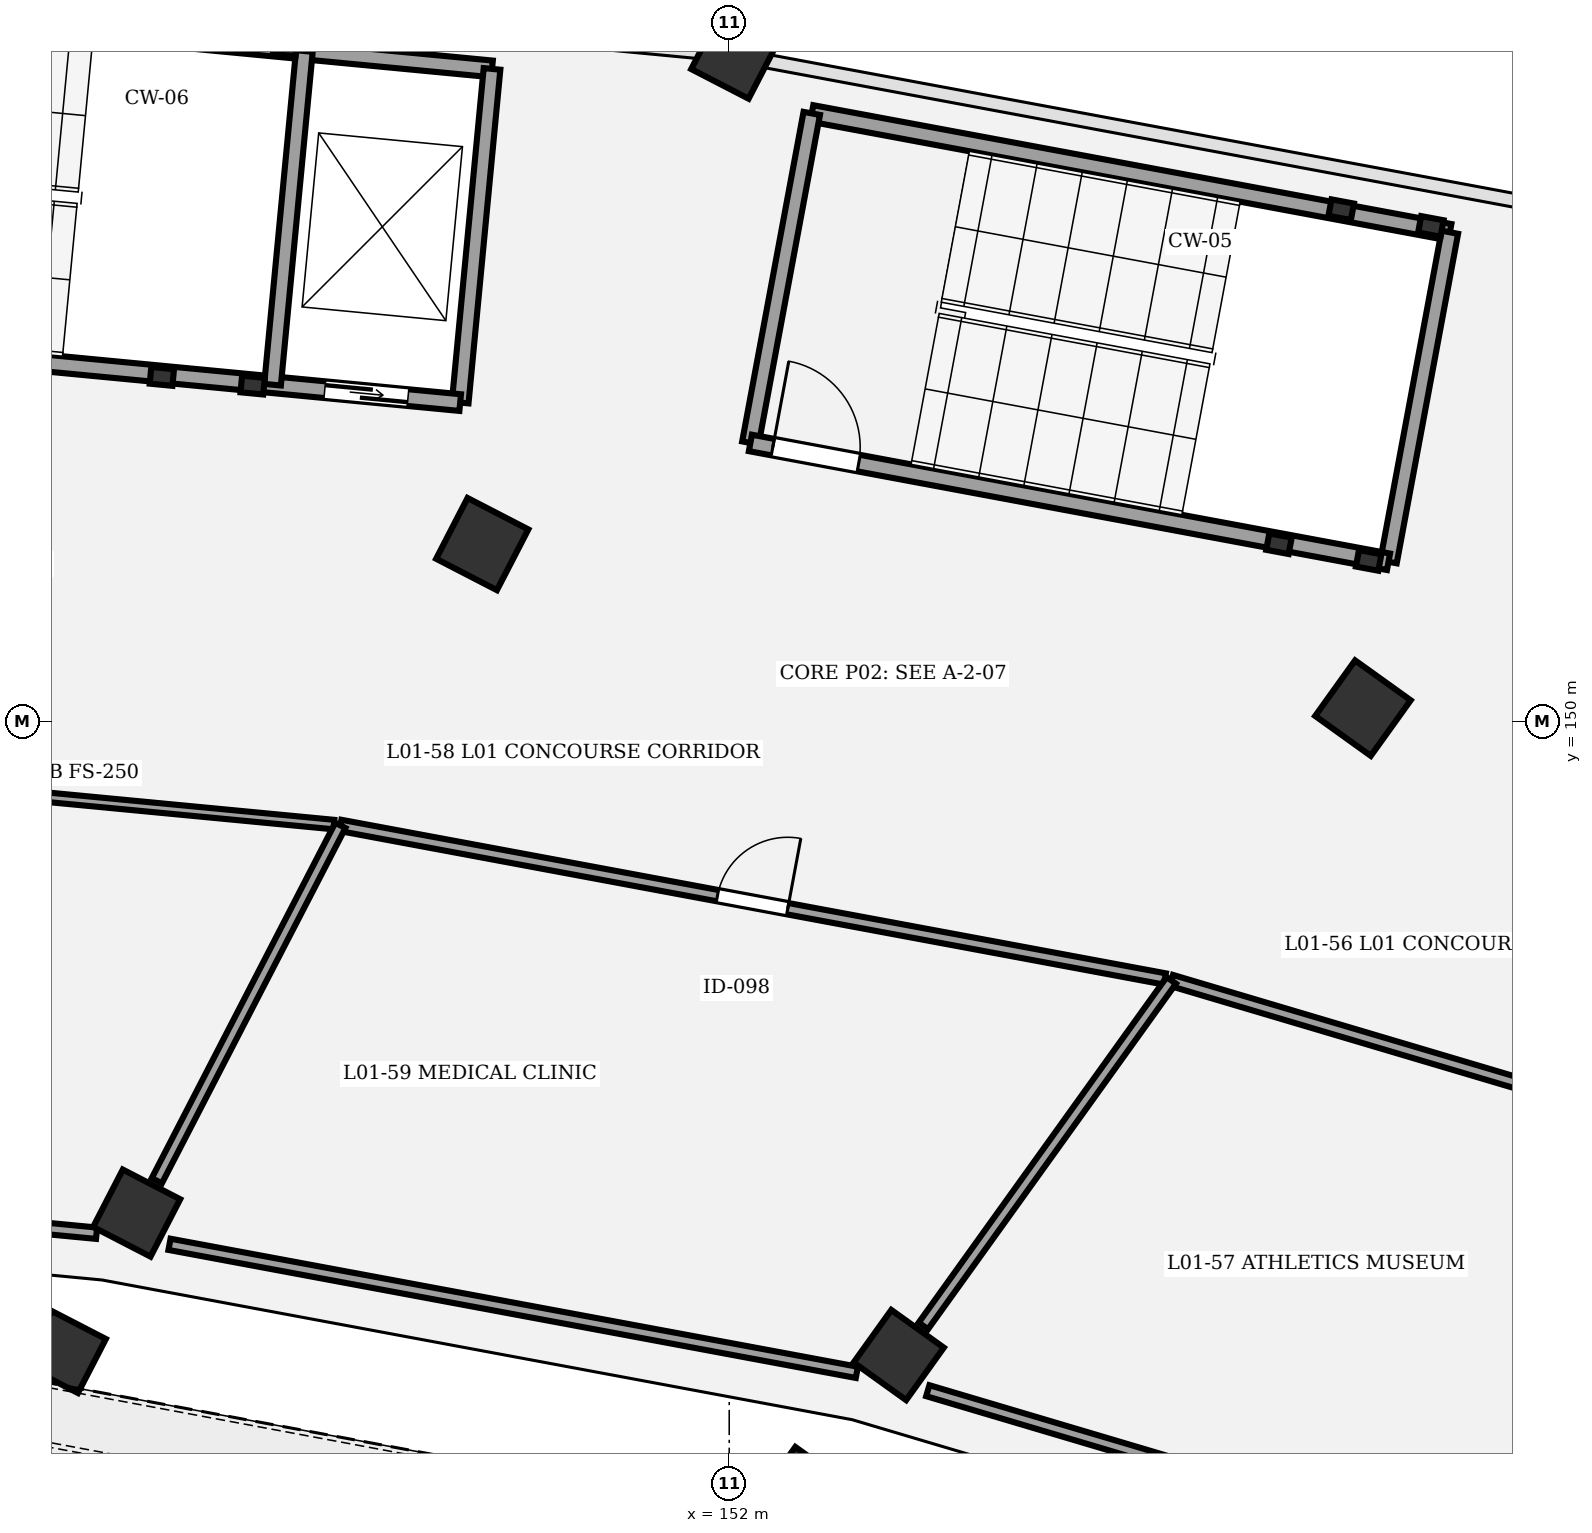
"""IFC4 building model, lengths in metres.
Left out: names, types, materials, properties, quantities, classifications, styles, units other than length and angle.
Written with IfcOpenShell. Run it as: python <this file> out.ifc"""

import sys

from ifc_helpers import new_model, si_unit, direction, frame, frame_2d, origin, origin_2d, place, context, subcontext, project, spatial, rectangle, extrude, element, fill, save


model = new_model("IFC4")
c1 = context("Model", 3, precision=1e-05, world=origin(), true_north=direction((0.0, 1.0)))
c2 = subcontext(c1, "Body", "Model", "MODEL_VIEW")
j1 = project(units=[si_unit("LENGTHUNIT", "METRE"), si_unit("PLANEANGLEUNIT", "RADIAN")], contexts=[c1])
p1 = place(None, origin())
s1 = spatial("IfcSite", under=j1, at=p1, CompositionType="ELEMENT")
p2 = place(p1, origin())
s2 = spatial("IfcBuilding", under=s1, at=p2, CompositionType="ELEMENT")
p3 = place(p2, frame((0.0, 0.0, 5.4)))
s3 = spatial("IfcBuildingStorey", under=s2, at=p3, CompositionType="ELEMENT", Elevation=5.4)
p4 = place(p3, frame((152.962, 139.899, 0.0), z_axis=(0.0, 0.0, 1.0), x_axis=(0.582974127943, 0.812490717577, 0.0)))
e1 = element("IfcColumn", 1, at=p4, inside=s3, PredefinedType="COLUMN", context=c2, shape_type="SweptSolid", body=[
    extrude(rectangle(XDim=0.8, YDim=0.8, at=origin_2d()), origin(), (0.0, 0.0, 1.0), 4.8),
])
p5 = place(p3, frame((154.23, 141.667, 0.0), z_axis=(0.0, 0.0, 1.0), x_axis=(0.582974127943, 0.812490717577, 0.0)))
e2 = element("IfcColumn", 2, at=p5, inside=s3, PredefinedType="COLUMN", context=c2, shape_type="SweptSolid", body=[
    extrude(rectangle(XDim=0.85, YDim=0.85, at=origin_2d()), origin(), (0.0, 0.0, 1.0), 4.8),
])
p6 = place(p3, frame((160.338, 150.177, 0.0), z_axis=(0.0, 0.0, 1.0), x_axis=(0.582974127943, 0.812490717577, 0.0)))
e3 = element("IfcColumn", 3, at=p6, inside=s3, PredefinedType="COLUMN", context=c2, shape_type="SweptSolid", body=[
    extrude(rectangle(XDim=0.9, YDim=0.9, at=origin_2d()), origin(), (0.0, 0.0, 1.0), 4.8),
])
p7 = place(p3, frame((143.259, 141.706, 0.0), z_axis=(0.0, 0.0, 1.0), x_axis=(0.458959712465, 0.888457079624, 0.0)))
e4 = element("IfcColumn", 4, at=p7, inside=s3, PredefinedType="COLUMN", context=c2, shape_type="SweptSolid", body=[
    extrude(rectangle(XDim=0.8, YDim=0.8, at=origin_2d()), origin(), (0.0, 0.0, 1.0), 4.8),
])
p8 = place(p3, frame((144.204, 143.534, 0.0), z_axis=(0.0, 0.0, 1.0), x_axis=(0.458959712465, 0.888457079624, 0.0)))
e5 = element("IfcColumn", 5, at=p8, inside=s3, PredefinedType="COLUMN", context=c2, shape_type="SweptSolid", body=[
    extrude(rectangle(XDim=0.85, YDim=0.85, at=origin_2d()), origin(), (0.0, 0.0, 1.0), 4.8),
])
p9 = place(p3, frame((148.75, 152.335, 0.0), z_axis=(0.0, 0.0, 1.0), x_axis=(0.458959712465, 0.888457079624, 0.0)))
e6 = element("IfcColumn", 6, at=p9, inside=s3, PredefinedType="COLUMN", context=c2, shape_type="SweptSolid", body=[
    extrude(rectangle(XDim=0.9, YDim=0.9, at=origin_2d()), origin(), (0.0, 0.0, 1.0), 4.8),
])
p10 = place(p3, frame((152.073, 158.767, 0.0), z_axis=(0.0, 0.0, 1.0), x_axis=(0.458959712465, 0.888457079624, 0.0)))
e7 = element("IfcColumn", 7, at=p10, inside=s3, PredefinedType="COLUMN", context=c2, shape_type="SweptSolid", body=[
    extrude(rectangle(XDim=0.85, YDim=0.85, at=origin_2d()), origin(), (0.0, 0.0, 1.0), 4.8),
])
for number, where, z_axis, x_axis in (
    (8, (144.535, 154.541, 0.0), (0.0, 0.0, 1.0), (0.995, -0.095, 0.0)),
    (9, (145.73, 154.427, 0.0), (0.0, 0.0, 1.0), (0.995, -0.095, 0.0)),
    (10, (146.154, 158.877, 0.0), (0.0, 0.0, 1.0), (0.995, -0.095, 0.0)),
):
    element("IfcColumn", number, at=place(p3, frame(where, z_axis=z_axis, x_axis=x_axis)), inside=s3, PredefinedType="COLUMN", context=c2, shape_type="SweptSolid", body=[
        extrude(rectangle(XDim=0.3, YDim=0.22, at=origin_2d()), origin(), (0.0, 0.0, 1.0), 4.8),
    ])
p11 = place(p3, frame((137.909, 159.634, 0.0), z_axis=(0.0, 0.0, 1.0), x_axis=(0.99547962713, -0.094975322952, 0.0)))
e11 = element("IfcWall", 11, at=p11, inside=s3, PredefinedType="SHEAR", context=c2, shape_type="SweptSolid", body=[
    extrude(rectangle(XDim=11.02, YDim=0.22, at=frame_2d((5.51, 0.0))), origin(), (0.0, 0.0, 1.0), 4.55),
])
p12 = place(p3, frame((148.46, 154.197, 0.0), z_axis=(0.0, 0.0, 1.0), x_axis=(0.095002424918, 0.995477041051, 0.0)))
e12 = element("IfcWall", 12, at=p12, inside=s3, PredefinedType="SHEAR", context=c2, shape_type="SweptSolid", body=[
    extrude(rectangle(XDim=4.41, YDim=0.22, at=frame_2d((2.205, 0.0))), origin(), (0.0, 0.0, 1.0), 4.55),
])
p13 = place(p3, frame((137.49, 155.243, 0.0), z_axis=(0.0, 0.0, 1.0), x_axis=(0.995481721489, -0.094953368458, 0.0)))
e13 = element("IfcWall", 13, at=p13, inside=s3, PredefinedType="SHEAR", context=c2, shape_type="SweptSolid", body=[
    extrude(rectangle(XDim=11.02, YDim=0.22, at=frame_2d((5.51, 0.0))), origin(), (0.0, 0.0, 1.0), 4.55),
])
p14 = place(p13, frame((0.3, 0.0, 0.0)))
e14 = element("IfcOpeningElement", 14, at=p14, cuts=e13, PredefinedType="OPENING", context=c2, shape_type="SweptSolid", body=[
    extrude(rectangle(XDim=1.15, YDim=2.15, at=frame_2d((0.575, 1.075))), frame((0.0, 0.12, 0.0), z_axis=(0.0, -1.0, 0.0), x_axis=(1.0, 0.0, 0.0)), (0.0, 0.0, 1.0), 0.24),
])
p15 = place(p13, frame((9.23, 0.0, 0.0)))
e15 = element("IfcOpeningElement", 15, at=p15, cuts=e13, PredefinedType="OPENING", context=c2, shape_type="SweptSolid", body=[
    extrude(rectangle(XDim=1.1, YDim=2.15, at=frame_2d((0.55, 1.075))), frame((0.0, 0.12, 0.0), z_axis=(0.0, -1.0, 0.0), x_axis=(1.0, 0.0, 0.0)), (0.0, 0.0, 1.0), 0.24),
])
p16 = place(p3, frame((145.991, 154.432, 0.0), z_axis=(0.0, 0.0, 1.0), x_axis=(0.094997189401, 0.995477540684, 0.0)))
e16 = element("IfcWall", 16, at=p16, inside=s3, PredefinedType="SHEAR", context=c2, shape_type="SweptSolid", body=[
    extrude(rectangle(XDim=4.41, YDim=0.22, at=frame_2d((2.205, 0.0))), origin(), (0.0, 0.0, 1.0), 4.55),
])
for number, where, z_axis, x_axis in (
    (17, (159.233, 152.34, 0.0), (0.0, 0.0, 1.0), (0.983, -0.183, 0.0)),
    (18, (160.413, 152.121, 0.0), (0.0, 0.0, 1.0), (0.983, -0.183, 0.0)),
    (19, (161.231, 156.515, 0.0), (0.0, 0.0, 1.0), (0.983, -0.183, 0.0)),
    (20, (160.052, 156.735, 0.0), (0.0, 0.0, 1.0), (0.983, -0.183, 0.0)),
):
    element("IfcColumn", number, at=place(p3, frame(where, z_axis=z_axis, x_axis=x_axis)), inside=s3, PredefinedType="COLUMN", context=c2, shape_type="SweptSolid", body=[
        extrude(rectangle(XDim=0.3, YDim=0.22, at=origin_2d()), origin(), (0.0, 0.0, 1.0), 4.8),
    ])
p17 = place(p3, frame((153.086, 158.001, 0.0), z_axis=(0.0, 0.0, 1.0), x_axis=(0.983097993869, -0.18308013123, 0.0)))
e21 = element("IfcWall", 21, at=p17, inside=s3, PredefinedType="SHEAR", context=c2, shape_type="SweptSolid", body=[
    extrude(rectangle(XDim=8.54, YDim=0.22, at=frame_2d((4.27, 0.0))), origin(), (0.0, 0.0, 1.0), 4.55),
])
for number, where, z_axis, x_axis in (
    (22, (152.279, 153.666, 0.0), (0.0, 0.0, 1.0), (0.183, 0.983, 0.0)),
    (23, (160.674, 152.103, 0.0), (0.0, 0.0, 1.0), (0.183, 0.983, 0.0)),
):
    element("IfcWall", number, at=place(p3, frame(where, z_axis=z_axis, x_axis=x_axis)), inside=s3, PredefinedType="SHEAR", context=c2, shape_type="SweptSolid", body=[
        extrude(rectangle(XDim=4.41, YDim=0.22, at=frame_2d((2.205, 0.0))), origin(), (0.0, 0.0, 1.0), 4.55),
    ])
p18 = place(p3, frame((152.279, 153.666, 0.0), z_axis=(0.0, 0.0, 1.0), x_axis=(0.983097993869, -0.18308013123, 0.0)))
e24 = element("IfcWall", 24, at=p18, inside=s3, PredefinedType="SHEAR", context=c2, shape_type="SweptSolid", body=[
    extrude(rectangle(XDim=8.54, YDim=0.22, at=frame_2d((4.27, 0.0))), origin(), (0.0, 0.0, 1.0), 4.55),
])
p19 = place(p18, frame((0.3, 0.0, 0.0)))
e25 = element("IfcOpeningElement", 25, at=p19, cuts=e24, PredefinedType="OPENING", context=c2, shape_type="SweptSolid", body=[
    extrude(rectangle(XDim=1.15, YDim=2.15, at=frame_2d((0.575, 1.075))), frame((0.0, 0.12, 0.0), z_axis=(0.0, -1.0, 0.0), x_axis=(1.0, 0.0, 0.0)), (0.0, 0.0, 1.0), 0.24),
])
p20 = place(p3, frame((157.817, 146.596, 0.0), z_axis=(0.0, 0.0, 1.0), x_axis=(0.958655809656, -0.284568161629, 0.0)))
e26 = element("IfcWall", 26, at=p20, inside=s3, PredefinedType="PARTITIONING", context=c2, shape_type="SweptSolid", body=[
    extrude(rectangle(XDim=9.891, YDim=0.15, at=frame_2d((4.946, 0.0))), origin(), (0.0, 0.0, 1.0), 3.55),
])
p21 = place(p20, frame((5.748, 0.0, 0.0)))
e27 = element("IfcOpeningElement", 27, at=p21, cuts=e26, PredefinedType="OPENING", context=c2, shape_type="SweptSolid", body=[
    extrude(rectangle(XDim=0.9, YDim=2.3, at=frame_2d((0.45, 1.15))), frame((0.0, 0.085, 0.0), z_axis=(0.0, -1.0, 0.0), x_axis=(1.0, 0.0, 0.0)), (0.0, 0.0, 1.0), 0.17),
])
p22 = place(p3, frame((146.884, 148.635, 0.0), z_axis=(0.0, 0.0, 1.0), x_axis=(0.983097372707, -0.183083466695, 0.0)))
e28 = element("IfcWall", 28, at=p22, inside=s3, PredefinedType="PARTITIONING", context=c2, shape_type="SweptSolid", body=[
    extrude(rectangle(XDim=11.035, YDim=0.15, at=frame_2d((5.517, 0.0))), origin(), (0.0, 0.0, 1.0), 3.55),
])
p23 = place(p22, frame((5.047, 0.0, 0.0)))
e29 = element("IfcOpeningElement", 29, at=p23, cuts=e28, PredefinedType="OPENING", context=c2, shape_type="SweptSolid", body=[
    extrude(rectangle(XDim=0.94, YDim=2.3, at=frame_2d((0.47, 1.15))), frame((0.0, 0.085, 0.0), z_axis=(0.0, -1.0, 0.0), x_axis=(1.0, 0.0, 0.0)), (0.0, 0.0, 1.0), 0.17),
])
p24 = place(p3, frame((134.035, 149.862, 0.0), z_axis=(0.0, 0.0, 1.0), x_axis=(0.995485111947, -0.094917816515, 0.0)))
e30 = element("IfcWall", 30, at=p24, inside=s3, PredefinedType="PARTITIONING", context=c2, shape_type="SweptSolid", body=[
    extrude(rectangle(XDim=12.822, YDim=0.125, at=frame_2d((6.411, 0.0))), origin(), (0.0, 0.0, 1.0), 3.55),
])
p25 = place(p24, frame((5.921, 0.0, 0.0)))
e31 = element("IfcOpeningElement", 31, at=p25, cuts=e30, PredefinedType="OPENING", context=c2, shape_type="SweptSolid", body=[
    extrude(rectangle(XDim=0.98, YDim=2.3, at=frame_2d((0.49, 1.15))), frame((0.0, 0.073, 0.0), z_axis=(0.0, -1.0, 0.0), x_axis=(1.0, 0.0, 0.0)), (0.0, 0.0, 1.0), 0.145),
])
p26 = place(p3, frame((161.978, 137.892, 0.0), z_axis=(0.0, 0.0, 1.0), x_axis=(0.677861530409, 0.735189598397, 0.0)))
e32 = element("IfcWall", 32, at=p26, inside=s3, PredefinedType="PARTITIONING", context=c2, shape_type="SweptSolid", body=[
    extrude(rectangle(XDim=7.972, YDim=0.15, at=frame_2d((3.986, 0.0))), origin(), (0.0, 0.0, 1.0), 3.55),
])
p27 = place(p3, frame((162.427, 138.878, 0.0), z_axis=(0.0, 0.0, 1.0), x_axis=(-0.95866142128, 0.284549256457, 0.0)))
e33 = element("IfcWall", 33, at=p27, inside=s3, PredefinedType="PARTITIONING", context=c2, shape_type="SweptSolid", body=[
    extrude(rectangle(XDim=8.151, YDim=0.15, at=frame_2d((4.075, 0.0))), origin(), (0.0, 0.0, 1.0), 3.55),
])
p28 = place(p3, frame((154.554, 142.049, 0.0), z_axis=(0.0, 0.0, 1.0), x_axis=(0.583015574976, 0.812460977116, 0.0)))
e34 = element("IfcWall", 34, at=p28, inside=s3, PredefinedType="PARTITIONING", context=c2, shape_type="SweptSolid", body=[
    extrude(rectangle(XDim=5.596, YDim=0.15, at=frame_2d((2.798, 0.0))), origin(), (0.0, 0.0, 1.0), 3.55),
])
p29 = place(p3, frame((153.679, 141.439, 0.0), z_axis=(0.0, 0.0, 1.0), x_axis=(-0.983094403703, 0.18309940854, 0.0)))
e35 = element("IfcWall", 35, at=p29, inside=s3, PredefinedType="PARTITIONING", context=c2, shape_type="SweptSolid", body=[
    extrude(rectangle(XDim=9.199, YDim=0.15, at=frame_2d((4.6, 0.0))), origin(), (0.0, 0.0, 1.0), 3.55),
])
p30 = place(p3, frame((144.469, 143.96, 0.0), z_axis=(0.0, 0.0, 1.0), x_axis=(0.458978545616, 0.88844735053, 0.0)))
e36 = element("IfcWall", 36, at=p30, inside=s3, PredefinedType="PARTITIONING", context=c2, shape_type="SweptSolid", body=[
    extrude(rectangle(XDim=5.262, YDim=0.15, at=frame_2d((2.631, 0.0))), origin(), (0.0, 0.0, 1.0), 3.55),
])
p31 = place(p3, frame((143.676, 143.269, 0.0), z_axis=(0.0, 0.0, 1.0), x_axis=(-0.995483110957, 0.094938800289, 0.0)))
e37 = element("IfcWall", 37, at=p31, inside=s3, PredefinedType="PARTITIONING", context=c2, shape_type="SweptSolid", body=[
    extrude(rectangle(XDim=10.836, YDim=0.15, at=frame_2d((5.418, 0.0))), origin(), (0.0, 0.0, 1.0), 3.55),
])
p32 = place(p3, frame((165.259, 158.854, 0.0), z_axis=(0.0, 0.0, 1.0), x_axis=(-0.983091639371, 0.183114250127, 0.0)))
e38 = element("IfcWall", 38, at=p32, inside=s3, PredefinedType="PARTITIONING", context=c2, shape_type="SweptSolid", body=[
    extrude(rectangle(XDim=11.223, YDim=0.15, at=frame_2d((5.612, 0.0))), origin(), (0.0, 0.0, 1.0), 3.55),
])
p33 = place(p15, origin())
e39 = element("IfcDoor", 39, at=p33, inside=s3, OperationType="DOUBLE_DOOR_SLIDING", PredefinedType="DOOR", context=c2, shape_type="SweptSolid", body=[
    extrude(rectangle(XDim=1.1, YDim=2.15, at=frame_2d((0.55, 1.075))), frame((0.0, 0.025, 0.0), z_axis=(0.0, -1.0, 0.0), x_axis=(1.0, 0.0, 0.0)), (0.0, 0.0, 1.0), 0.05),
])
fill(e15, e39)
p34 = place(p19, origin())
e40 = element("IfcDoor", 40, at=p34, inside=s3, OperationType="SINGLE_SWING_LEFT", PredefinedType="DOOR", context=c2, shape_type="SweptSolid", body=[
    extrude(rectangle(XDim=1.15, YDim=2.15, at=frame_2d((0.575, 1.075))), frame((0.0, 0.025, 0.0), z_axis=(0.0, -1.0, 0.0), x_axis=(1.0, 0.0, 0.0)), (0.0, 0.0, 1.0), 0.05),
])
fill(e25, e40)
p35 = place(p23, origin())
e41 = element("IfcDoor", 41, at=p35, inside=s3, OperationType="SINGLE_SWING_RIGHT", PredefinedType="DOOR", context=c2, shape_type="SweptSolid", body=[
    extrude(rectangle(XDim=0.94, YDim=2.3, at=frame_2d((0.47, 1.15))), frame((0.0, 0.025, 0.0), z_axis=(0.0, -1.0, 0.0), x_axis=(1.0, 0.0, 0.0)), (0.0, 0.0, 1.0), 0.05),
])
fill(e29, e41)
save(model, sys.argv[1])
